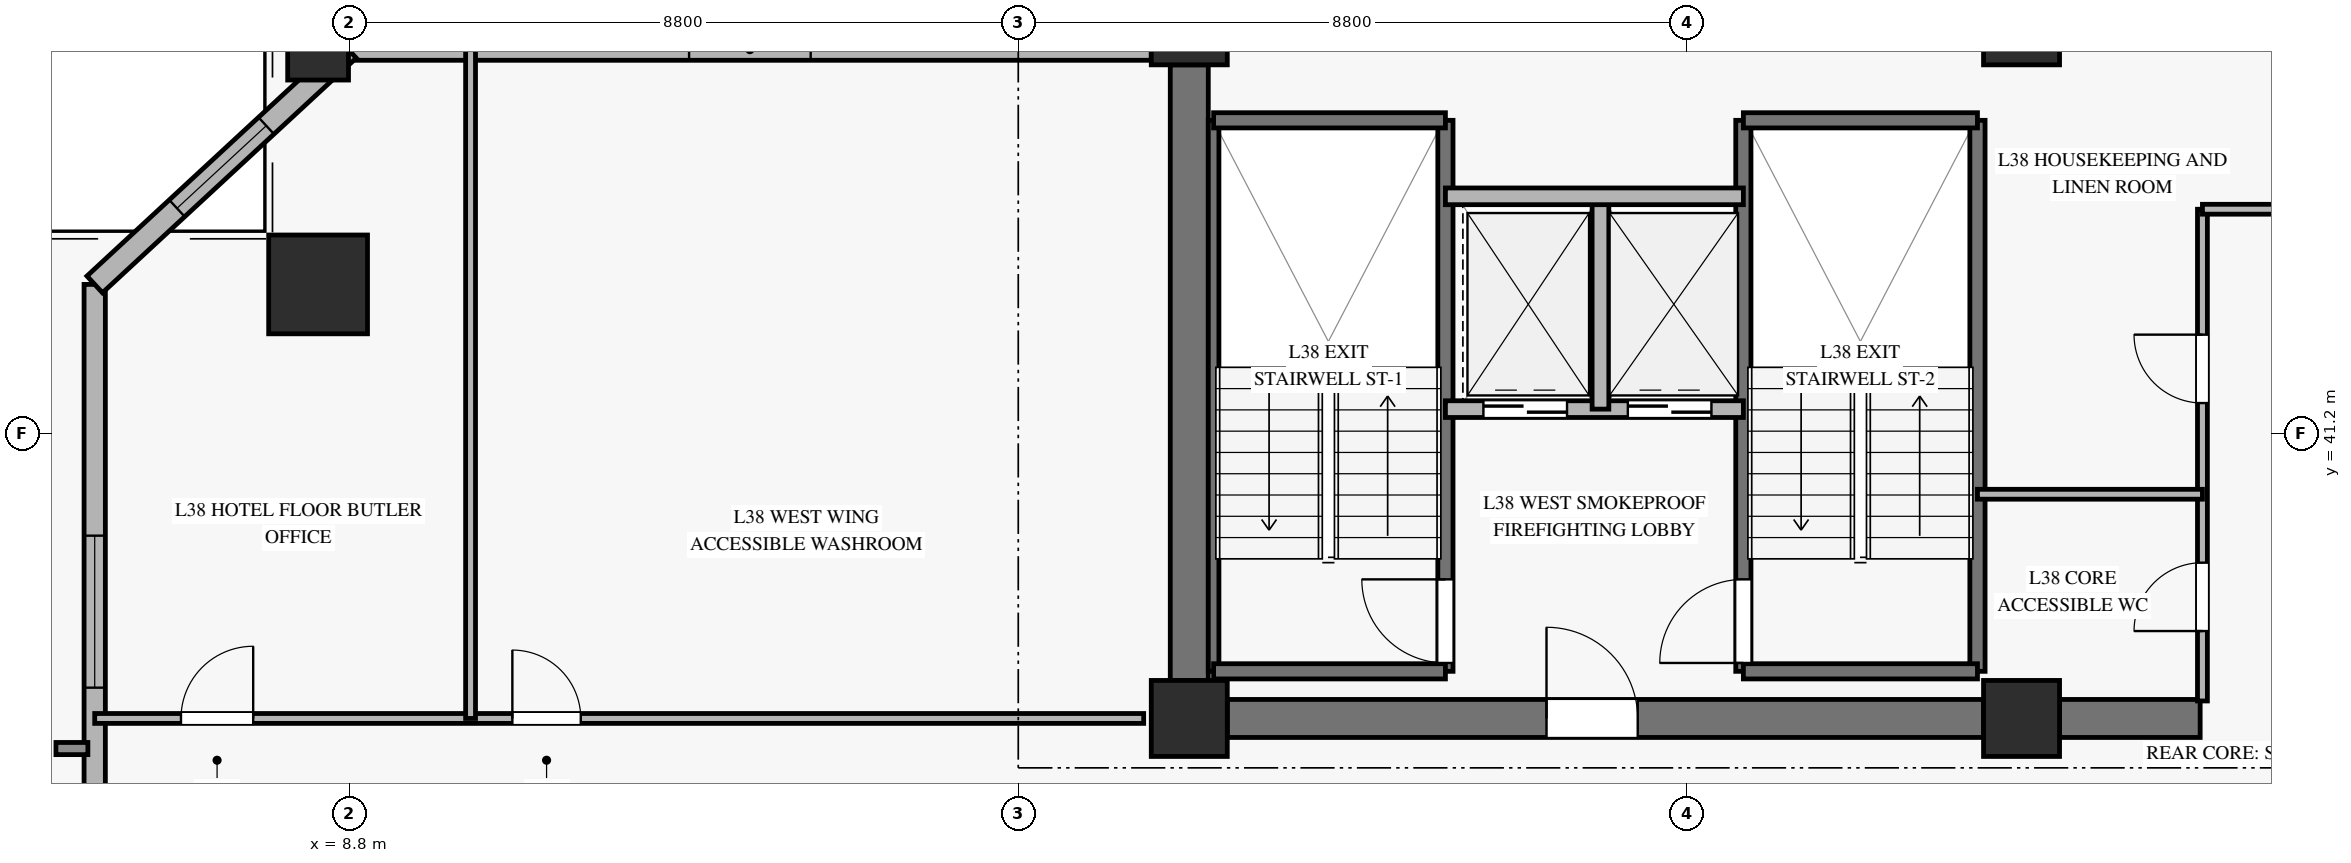
"""IFC4 building model, lengths in metres.
Left out: names, types, materials, properties, quantities, classifications, styles, units other than length and angle.
Written with IfcOpenShell. Run it as: python <this file> out.ifc"""

import sys

from ifc_helpers import new_model, si_unit, direction, frame, frame_2d, origin, origin_2d, place, context, subcontext, project, spatial, rectangle, hollow_rectangle, extrude, source, transform, mapped, element, fill, save


model = new_model("IFC4")
c1 = context("Model", 3, precision=1e-05, world=origin(), true_north=direction((0.0, 1.0)))
c2 = subcontext(c1, "Body", "Model", "MODEL_VIEW")
j1 = project(units=[si_unit("LENGTHUNIT", "METRE"), si_unit("PLANEANGLEUNIT", "RADIAN")], contexts=[c1])
p1 = place(None, origin())
s1 = spatial("IfcSite", under=j1, at=p1, CompositionType="ELEMENT")
p2 = place(p1, origin())
s2 = spatial("IfcBuilding", under=s1, at=p2, CompositionType="ELEMENT")
p3 = place(p2, frame((0.0, 0.0, 156.2)))
s3 = spatial("IfcBuildingStorey", under=s2, at=p3, CompositionType="ELEMENT", Elevation=156.2)
m1 = source(origin(), c2, "Body", "SweptSolid", [
    extrude(rectangle(XDim=1.0, YDim=1.0, at=origin_2d()), origin(), (0.0, 0.0, 1.0), 3.27),
])
for number, where, z_axis, x_axis in (
    (1, (19.85, 37.45, 0.0), (0.0, 0.0, 1.0), (1.0, 0.0, 0.0)),
    (2, (19.85, 46.55, 0.0), (0.0, 0.0, 1.0), (1.0, 0.0, 0.0)),
    (3, (30.8, 37.45, 0.0), (0.0, 0.0, 1.0), (1.0, 0.0, 0.0)),
    (4, (30.8, 46.55, 0.0), (0.0, 0.0, 1.0), (1.0, 0.0, 0.0)),
):
    element("IfcColumn", number, at=place(p3, frame(where, z_axis=z_axis, x_axis=x_axis)), inside=s3, PredefinedType="PILASTER", context=c2, shape_type="MappedRepresentation", body=[
        mapped(m1, transform((0.0, 0.0, 0.0), x_axis=(1.0, 0.0, 0.0), y_axis=(0.0, 1.0, 0.0), z_axis=(0.0, 0.0, 1.0), scale=1.0)),
    ])
p4 = place(p3, frame((20.35, 37.45, 0.0), z_axis=(0.0, 0.0, 1.0), x_axis=(1.0, 0.0, 0.0)))
e5 = element("IfcWall", 5, at=p4, inside=s3, PredefinedType="SHEAR", context=c2, shape_type="SweptSolid", body=[
    extrude(rectangle(XDim=9.95, YDim=0.5, at=frame_2d((4.975, 0.0))), origin(), (0.0, 0.0, 1.0), 3.27),
])
p5 = place(p4, frame((4.2, 0.0, 0.0)))
e6 = element("IfcOpeningElement", 6, at=p5, cuts=e5, PredefinedType="OPENING", context=c2, shape_type="SweptSolid", body=[
    extrude(rectangle(XDim=1.2, YDim=2.15, at=frame_2d((0.6, 1.075))), frame((0.0, 0.26, 0.0), z_axis=(0.0, -1.0, 0.0), x_axis=(1.0, 0.0, 0.0)), (0.0, 0.0, 1.0), 0.52),
])
p6 = place(p3, frame((31.3, 37.45, 0.0), z_axis=(0.0, 0.0, 1.0), x_axis=(1.0, 0.0, 0.0)))
e7 = element("IfcWall", 7, at=p6, inside=s3, PredefinedType="SHEAR", context=c2, shape_type="SweptSolid", body=[
    extrude(rectangle(XDim=1.85, YDim=0.5, at=frame_2d((0.925, 0.0))), origin(), (0.0, 0.0, 1.0), 3.27),
])
p7 = place(p3, frame((19.85, 37.95, 0.0), z_axis=(0.0, 0.0, 1.0), x_axis=(0.0, 1.0, 0.0)))
e8 = element("IfcWall", 8, at=p7, inside=s3, PredefinedType="SHEAR", context=c2, shape_type="SweptSolid", body=[
    extrude(rectangle(XDim=8.1, YDim=0.5, at=frame_2d((4.05, 0.0))), origin(), (0.0, 0.0, 1.0), 3.27),
])
m2 = source(origin(), c2, "Body", "SweptSolid", [
    extrude(hollow_rectangle(XDim=1.3, YDim=1.3, WallThickness=0.06, at=origin_2d()), origin(), (0.0, 0.0, 1.0), 3.277),
])
p8 = place(p3, frame((8.388, 43.161, 0.0), z_axis=(0.063777069764, 0.007972133721, 0.997932327594), x_axis=(-0.124034734589, 0.992277876714, 0.0)))
e9 = element("IfcColumn", 9, at=p8, inside=s3, PredefinedType="COLUMN", context=c2, shape_type="MappedRepresentation", body=[
    mapped(m2, transform((0.0, 0.0, 0.0), x_axis=(1.0, 0.0, 0.0), y_axis=(0.0, 1.0, 0.0), z_axis=(0.0, 0.0, 1.0), scale=1.0)),
])
m3 = source(origin(), c2, "Body", "SweptSolid", [
    extrude(hollow_rectangle(XDim=0.8, YDim=0.8, WallThickness=0.036, at=origin_2d()), origin(), (0.0, 0.0, 1.0), 3.277),
])
p9 = place(p3, frame((8.388, 46.25, 0.0), z_axis=(0.063779096534, 0.0, 0.997964040858), x_axis=(0.0, 1.0, 0.0)))
e10 = element("IfcColumn", 10, at=p9, inside=s3, PredefinedType="COLUMN", context=c2, shape_type="MappedRepresentation", body=[
    mapped(m3, transform((0.0, 0.0, 0.0), x_axis=(1.0, 0.0, 0.0), y_axis=(0.0, 1.0, 0.0), z_axis=(0.0, 0.0, 1.0), scale=1.0)),
])
p10 = place(p3, frame((5.449, 27.736, 0.0), z_axis=(0.0, 0.0, 1.0), x_axis=(0.0, 1.0, 0.0)))
e11 = element("IfcWall", 11, at=p10, inside=s3, PredefinedType="SOLIDWALL", context=c2, shape_type="SweptSolid", body=[
    extrude(rectangle(XDim=15.425, YDim=0.28, at=frame_2d((7.712, 0.0))), origin(), (0.0, 0.0, 1.0), 2.75),
])
p11 = place(p10, frame((10.119, 0.0, 0.45)))
e12 = element("IfcOpeningElement", 12, at=p11, cuts=e11, PredefinedType="OPENING", context=c2, shape_type="SweptSolid", body=[
    extrude(rectangle(XDim=2.0, YDim=2.0, at=frame_2d((1.0, 1.0))), frame((0.0, 0.15, 0.0), z_axis=(0.0, -1.0, 0.0), x_axis=(1.0, 0.0, 0.0)), (0.0, 0.0, 1.0), 0.3),
])
p12 = place(p3, frame((8.788, 46.25, 0.0), z_axis=(0.0, 0.0, 1.0), x_axis=(1.0, 0.0, 0.0)))
e13 = element("IfcWall", 13, at=p12, inside=s3, PredefinedType="SOLIDWALL", context=c2, shape_type="SweptSolid", body=[
    extrude(rectangle(XDim=10.562, YDim=0.28, at=frame_2d((5.281, 0.0))), origin(), (0.0, 0.0, 1.0), 2.75),
])
p13 = place(p12, frame((4.481, 0.0, 0.45)))
e14 = element("IfcOpeningElement", 14, at=p13, cuts=e13, PredefinedType="OPENING", context=c2, shape_type="SweptSolid", body=[
    extrude(rectangle(XDim=1.6, YDim=2.0, at=frame_2d((0.8, 1.0))), frame((0.0, 0.15, 0.0), z_axis=(0.0, -1.0, 0.0), x_axis=(1.0, 0.0, 0.0)), (0.0, 0.0, 1.0), 0.3),
])
p14 = place(p3, frame((8.788, 46.25, 0.0), z_axis=(0.0, 0.0, 1.0), x_axis=(-0.734051949579, -0.679093318565, 0.0)))
e15 = element("IfcWall", 15, at=p14, inside=s3, PredefinedType="SOLIDWALL", context=c2, shape_type="SweptSolid", body=[
    extrude(rectangle(XDim=4.549, YDim=0.3, at=frame_2d((2.274, 0.0))), origin(), (0.0, 0.0, 1.0), 2.75),
])
p15 = place(p14, frame((1.474, 0.0, 0.45)))
e16 = element("IfcOpeningElement", 16, at=p15, cuts=e15, PredefinedType="OPENING", context=c2, shape_type="SweptSolid", body=[
    extrude(rectangle(XDim=1.6, YDim=2.0, at=frame_2d((0.8, 1.0))), frame((0.0, 0.16, 0.0), z_axis=(0.0, -1.0, 0.0), x_axis=(1.0, 0.0, 0.0)), (0.0, 0.0, 1.0), 0.32),
])
p16 = place(p3, frame((20.17, 38.07, 0.0), z_axis=(0.0, 0.0, 1.0), x_axis=(0.0, 1.0, 0.0)))
e17 = element("IfcWall", 17, at=p16, inside=s3, PredefinedType="SOLIDWALL", context=c2, shape_type="SweptSolid", body=[
    extrude(rectangle(XDim=7.25, YDim=0.14, at=frame_2d((3.625, 0.0))), origin(), (0.0, 0.0, 1.0), 3.5),
])
p17 = place(p3, frame((23.22, 38.07, 0.0), z_axis=(0.0, 0.0, 1.0), x_axis=(0.0, 1.0, 0.0)))
e18 = element("IfcWall", 18, at=p17, inside=s3, PredefinedType="SOLIDWALL", context=c2, shape_type="SweptSolid", body=[
    extrude(rectangle(XDim=7.25, YDim=0.2, at=frame_2d((3.625, 0.0))), origin(), (0.0, 0.0, 1.0), 3.5),
])
p18 = place(p17, frame((0.11, 0.0, 0.0)))
e19 = element("IfcOpeningElement", 19, at=p18, cuts=e18, PredefinedType="OPENING", context=c2, shape_type="SweptSolid", body=[
    extrude(rectangle(XDim=1.1, YDim=2.15, at=frame_2d((0.55, 1.075))), frame((0.0, 0.11, 0.0), z_axis=(0.0, -1.0, 0.0), x_axis=(1.0, 0.0, 0.0)), (0.0, 0.0, 1.0), 0.22),
])
for number, where, z_axis, x_axis in (
    (20, (20.17, 45.32, 0.0), (0.0, 0.0, 1.0), (1.0, 0.0, 0.0)),
    (21, (20.17, 38.07, 0.0), (0.0, 0.0, 1.0), (1.0, 0.0, 0.0)),
):
    element("IfcWall", number, at=place(p3, frame(where, z_axis=z_axis, x_axis=x_axis)), inside=s3, PredefinedType="SOLIDWALL", context=c2, shape_type="SweptSolid", body=[
        extrude(rectangle(XDim=3.05, YDim=0.2, at=frame_2d((1.525, 0.0))), origin(), (0.0, 0.0, 1.0), 3.5),
    ])
p19 = place(p3, frame((27.14, 38.07, 0.0), z_axis=(0.0, 0.0, 1.0), x_axis=(0.0, 1.0, 0.0)))
e22 = element("IfcWall", 22, at=p19, inside=s3, PredefinedType="SOLIDWALL", context=c2, shape_type="SweptSolid", body=[
    extrude(rectangle(XDim=7.25, YDim=0.2, at=frame_2d((3.625, 0.0))), origin(), (0.0, 0.0, 1.0), 3.5),
])
p20 = place(p19, frame((0.11, 0.0, 0.0)))
e23 = element("IfcOpeningElement", 23, at=p20, cuts=e22, PredefinedType="OPENING", context=c2, shape_type="SweptSolid", body=[
    extrude(rectangle(XDim=1.1, YDim=2.15, at=frame_2d((0.55, 1.075))), frame((0.0, 0.11, 0.0), z_axis=(0.0, -1.0, 0.0), x_axis=(1.0, 0.0, 0.0)), (0.0, 0.0, 1.0), 0.22),
])
p21 = place(p3, frame((30.22, 38.07, 0.0), z_axis=(0.0, 0.0, 1.0), x_axis=(0.0, 1.0, 0.0)))
e24 = element("IfcWall", 24, at=p21, inside=s3, PredefinedType="SOLIDWALL", context=c2, shape_type="SweptSolid", body=[
    extrude(rectangle(XDim=7.25, YDim=0.2, at=frame_2d((3.625, 0.0))), origin(), (0.0, 0.0, 1.0), 3.5),
])
for number, where, z_axis, x_axis in (
    (25, (27.14, 45.32, 0.0), (0.0, 0.0, 1.0), (1.0, 0.0, 0.0)),
    (26, (27.14, 38.07, 0.0), (0.0, 0.0, 1.0), (1.0, 0.0, 0.0)),
):
    element("IfcWall", number, at=place(p3, frame(where, z_axis=z_axis, x_axis=x_axis)), inside=s3, PredefinedType="SOLIDWALL", context=c2, shape_type="SweptSolid", body=[
        extrude(rectangle(XDim=3.08, YDim=0.2, at=frame_2d((1.54, 0.0))), origin(), (0.0, 0.0, 1.0), 3.5),
    ])
p22 = place(p3, frame((23.22, 41.52, 0.0), z_axis=(0.0, 0.0, 1.0), x_axis=(1.0, 0.0, 0.0)))
e27 = element("IfcWall", 27, at=p22, inside=s3, PredefinedType="SOLIDWALL", context=c2, shape_type="SweptSolid", body=[
    extrude(rectangle(XDim=3.92, YDim=0.22, at=frame_2d((1.96, 0.0))), origin(), (0.0, 0.0, 1.0), 3.27),
])
p23 = place(p22, frame((0.5, 0.0, 0.0)))
e28 = element("IfcOpeningElement", 28, at=p23, cuts=e27, PredefinedType="OPENING", context=c2, shape_type="SweptSolid", body=[
    extrude(rectangle(XDim=1.1, YDim=2.2, at=frame_2d((0.55, 1.1))), frame((0.0, 0.12, 0.0), z_axis=(0.0, -1.0, 0.0), x_axis=(1.0, 0.0, 0.0)), (0.0, 0.0, 1.0), 0.24),
])
p24 = place(p22, frame((2.4, 0.0, 0.0)))
e29 = element("IfcOpeningElement", 29, at=p24, cuts=e27, PredefinedType="OPENING", context=c2, shape_type="SweptSolid", body=[
    extrude(rectangle(XDim=1.1, YDim=2.2, at=frame_2d((0.55, 1.1))), frame((0.0, 0.12, 0.0), z_axis=(0.0, -1.0, 0.0), x_axis=(1.0, 0.0, 0.0)), (0.0, 0.0, 1.0), 0.24),
])
p25 = place(p3, frame((25.26, 41.52, 0.0), z_axis=(0.0, 0.0, 1.0), x_axis=(0.0, 1.0, 0.0)))
e30 = element("IfcWall", 30, at=p25, inside=s3, PredefinedType="SOLIDWALL", context=c2, shape_type="SweptSolid", body=[
    extrude(rectangle(XDim=2.8, YDim=0.22, at=frame_2d((1.4, 0.0))), origin(), (0.0, 0.0, 1.0), 3.27),
])
p26 = place(p3, frame((23.22, 44.32, 0.0), z_axis=(0.0, 0.0, 1.0), x_axis=(1.0, 0.0, 0.0)))
e31 = element("IfcWall", 31, at=p26, inside=s3, PredefinedType="SOLIDWALL", context=c2, shape_type="SweptSolid", body=[
    extrude(rectangle(XDim=3.92, YDim=0.22, at=frame_2d((1.96, 0.0))), origin(), (0.0, 0.0, 1.0), 3.27),
])
p27 = place(p3, frame((33.18, 37.68, 0.0), z_axis=(0.0, 0.0, 1.0), x_axis=(0.0, 1.0, 0.0)))
e32 = element("IfcWall", 32, at=p27, inside=s3, PredefinedType="PARTITIONING", context=c2, shape_type="SweptSolid", body=[
    extrude(rectangle(XDim=6.47, YDim=0.13, at=frame_2d((3.235, 0.0))), origin(), (0.0, 0.0, 1.0), 2.355),
])
p28 = place(p27, frame((0.92, 0.0, 0.0)))
e33 = element("IfcOpeningElement", 33, at=p28, cuts=e32, PredefinedType="OPENING", context=c2, shape_type="SweptSolid", body=[
    extrude(rectangle(XDim=0.9, YDim=2.1, at=frame_2d((0.45, 1.05))), frame((0.0, 0.075, 0.0), z_axis=(0.0, -1.0, 0.0), x_axis=(1.0, 0.0, 0.0)), (0.0, 0.0, 1.0), 0.15),
])
p29 = place(p27, frame((3.92, 0.0, 0.0)))
e34 = element("IfcOpeningElement", 34, at=p29, cuts=e32, PredefinedType="OPENING", context=c2, shape_type="SweptSolid", body=[
    extrude(rectangle(XDim=0.9, YDim=2.1, at=frame_2d((0.45, 1.05))), frame((0.0, 0.075, 0.0), z_axis=(0.0, -1.0, 0.0), x_axis=(1.0, 0.0, 0.0)), (0.0, 0.0, 1.0), 0.15),
])
p30 = place(p3, frame((33.18, 44.15, 0.0), z_axis=(0.0, 0.0, 1.0), x_axis=(1.0, 0.0, 0.0)))
e35 = element("IfcWall", 35, at=p30, inside=s3, PredefinedType="PARTITIONING", context=c2, shape_type="SweptSolid", body=[
    extrude(rectangle(XDim=2.97, YDim=0.13, at=frame_2d((1.485, 0.0))), origin(), (0.0, 0.0, 1.0), 2.555),
])
p31 = place(p3, frame((30.22, 40.4, 0.0), z_axis=(0.0, 0.0, 1.0), x_axis=(1.0, 0.0, 0.0)))
e36 = element("IfcWall", 36, at=p31, inside=s3, PredefinedType="PARTITIONING", context=c2, shape_type="SweptSolid", body=[
    extrude(rectangle(XDim=2.96, YDim=0.13, at=frame_2d((1.48, 0.0))), origin(), (0.0, 0.0, 1.0), 2.555),
])
p32 = place(p3, frame((5.449, 37.45, 0.0), z_axis=(0.0, 0.0, 1.0), x_axis=(1.0, 0.0, 0.0)))
e37 = element("IfcWall", 37, at=p32, inside=s3, PredefinedType="PARTITIONING", context=c2, shape_type="SweptSolid", body=[
    extrude(rectangle(XDim=13.801, YDim=0.13, at=frame_2d((6.9, 0.0))), origin(), (0.0, 0.0, 1.0), 2.755),
])
p33 = place(p32, frame((1.135, 0.0, 0.0)))
e38 = element("IfcOpeningElement", 38, at=p33, cuts=e37, PredefinedType="OPENING", context=c2, shape_type="SweptSolid", body=[
    extrude(rectangle(XDim=0.95, YDim=2.1, at=frame_2d((0.475, 1.05))), frame((0.0, 0.075, 0.0), z_axis=(0.0, -1.0, 0.0), x_axis=(1.0, 0.0, 0.0)), (0.0, 0.0, 1.0), 0.15),
])
p34 = place(p32, frame((5.495, 0.0, 0.0)))
e39 = element("IfcOpeningElement", 39, at=p34, cuts=e37, PredefinedType="OPENING", context=c2, shape_type="SweptSolid", body=[
    extrude(rectangle(XDim=0.9, YDim=2.1, at=frame_2d((0.45, 1.05))), frame((0.0, 0.075, 0.0), z_axis=(0.0, -1.0, 0.0), x_axis=(1.0, 0.0, 0.0)), (0.0, 0.0, 1.0), 0.15),
])
p35 = place(p3, frame((10.394, 37.45, 0.0), z_axis=(0.0, 0.0, 1.0), x_axis=(0.0, 1.0, 0.0)))
e40 = element("IfcWall", 40, at=p35, inside=s3, PredefinedType="PARTITIONING", context=c2, shape_type="SweptSolid", body=[
    extrude(rectangle(XDim=8.8, YDim=0.13, at=frame_2d((4.4, 0.0))), origin(), (0.0, 0.0, 1.0), 3.27),
])
m4 = source(origin(), c2, "Body", "SweptSolid", [
    extrude(rectangle(XDim=2.0, YDim=2.0, at=frame_2d((1.0, 1.0))), frame((0.0, 0.03, 0.0), z_axis=(0.0, -1.0, 0.0), x_axis=(1.0, 0.0, 0.0)), (0.0, 0.0, 1.0), 0.06),
])
p36 = place(p11, origin())
e41 = element("IfcWindow", 41, at=p36, inside=s3, PartitioningType="SINGLE_PANEL", PredefinedType="WINDOW", context=c2, shape_type="MappedRepresentation", body=[
    mapped(m4, transform((0.0, 0.0, 0.0), x_axis=(1.0, 0.0, 0.0), y_axis=(0.0, 1.0, 0.0), z_axis=(0.0, 0.0, 1.0), scale=1.0)),
])
fill(e12, e41)
m5 = source(origin(), c2, "Body", "SweptSolid", [
    extrude(rectangle(XDim=1.6, YDim=2.0, at=frame_2d((0.8, 1.0))), frame((0.0, 0.03, 0.0), z_axis=(0.0, -1.0, 0.0), x_axis=(1.0, 0.0, 0.0)), (0.0, 0.0, 1.0), 0.06),
])
p37 = place(p15, origin())
e42 = element("IfcWindow", 42, at=p37, inside=s3, PartitioningType="SINGLE_PANEL", PredefinedType="WINDOW", context=c2, shape_type="MappedRepresentation", body=[
    mapped(m5, transform((0.0, 0.0, 0.0), x_axis=(1.0, 0.0, 0.0), y_axis=(0.0, 1.0, 0.0), z_axis=(0.0, 0.0, 1.0), scale=1.0)),
])
fill(e16, e42)
m6 = source(origin(), c2, "Body", "SweptSolid", [
    extrude(rectangle(XDim=1.1, YDim=2.15, at=frame_2d((0.55, 1.075))), frame((0.0, 0.025, 0.0), z_axis=(0.0, -1.0, 0.0), x_axis=(1.0, 0.0, 0.0)), (0.0, 0.0, 1.0), 0.05),
])
p38 = place(p18, origin())
e43 = element("IfcDoor", 43, at=p38, inside=s3, OperationType="SINGLE_SWING_RIGHT", PredefinedType="DOOR", context=c2, shape_type="MappedRepresentation", body=[
    mapped(m6, transform((0.0, 0.0, 0.0), x_axis=(1.0, 0.0, 0.0), y_axis=(0.0, 1.0, 0.0), z_axis=(0.0, 0.0, 1.0), scale=1.0)),
])
fill(e19, e43)
p39 = place(p20, origin())
e44 = element("IfcDoor", 44, at=p39, inside=s3, OperationType="SINGLE_SWING_LEFT", PredefinedType="DOOR", context=c2, shape_type="MappedRepresentation", body=[
    mapped(m6, transform((0.0, 0.0, 0.0), x_axis=(1.0, 0.0, 0.0), y_axis=(0.0, 1.0, 0.0), z_axis=(0.0, 0.0, 1.0), scale=1.0)),
])
fill(e23, e44)
m7 = source(origin(), c2, "Body", "SweptSolid", [
    extrude(rectangle(XDim=1.1, YDim=2.2, at=frame_2d((0.55, 1.1))), frame((0.0, 0.025, 0.0), z_axis=(0.0, -1.0, 0.0), x_axis=(1.0, 0.0, 0.0)), (0.0, 0.0, 1.0), 0.05),
])
p40 = place(p23, origin())
e45 = element("IfcDoor", 45, at=p40, inside=s3, OperationType="SLIDING_TO_LEFT", PredefinedType="DOOR", context=c2, shape_type="MappedRepresentation", body=[
    mapped(m7, transform((0.0, 0.0, 0.0), x_axis=(1.0, 0.0, 0.0), y_axis=(0.0, 1.0, 0.0), z_axis=(0.0, 0.0, 1.0), scale=1.0)),
])
fill(e28, e45)
p41 = place(p24, origin())
e46 = element("IfcDoor", 46, at=p41, inside=s3, OperationType="SLIDING_TO_LEFT", PredefinedType="DOOR", context=c2, shape_type="MappedRepresentation", body=[
    mapped(m7, transform((0.0, 0.0, 0.0), x_axis=(1.0, 0.0, 0.0), y_axis=(0.0, 1.0, 0.0), z_axis=(0.0, 0.0, 1.0), scale=1.0)),
])
fill(e29, e46)
m8 = source(origin(), c2, "Body", "SweptSolid", [
    extrude(rectangle(XDim=1.2, YDim=2.15, at=frame_2d((0.6, 1.075))), frame((0.0, 0.025, 0.0), z_axis=(0.0, -1.0, 0.0), x_axis=(1.0, 0.0, 0.0)), (0.0, 0.0, 1.0), 0.05),
])
p42 = place(p5, origin())
e47 = element("IfcDoor", 47, at=p42, inside=s3, OperationType="SINGLE_SWING_LEFT", PredefinedType="DOOR", context=c2, shape_type="MappedRepresentation", body=[
    mapped(m8, transform((0.0, 0.0, 0.0), x_axis=(1.0, 0.0, 0.0), y_axis=(0.0, 1.0, 0.0), z_axis=(0.0, 0.0, 1.0), scale=1.0)),
])
fill(e6, e47)
m9 = source(origin(), c2, "Body", "SweptSolid", [
    extrude(rectangle(XDim=0.9, YDim=2.1, at=frame_2d((0.45, 1.05))), frame((0.0, 0.025, 0.0), z_axis=(0.0, -1.0, 0.0), x_axis=(1.0, 0.0, 0.0)), (0.0, 0.0, 1.0), 0.05),
])
p43 = place(p28, origin())
e48 = element("IfcDoor", 48, at=p43, inside=s3, OperationType="SINGLE_SWING_LEFT", PredefinedType="DOOR", context=c2, shape_type="MappedRepresentation", body=[
    mapped(m9, transform((0.0, 0.0, 0.0), x_axis=(1.0, 0.0, 0.0), y_axis=(0.0, 1.0, 0.0), z_axis=(0.0, 0.0, 1.0), scale=1.0)),
])
fill(e33, e48)
p44 = place(p29, origin())
e49 = element("IfcDoor", 49, at=p44, inside=s3, OperationType="SINGLE_SWING_RIGHT", PredefinedType="DOOR", context=c2, shape_type="MappedRepresentation", body=[
    mapped(m9, transform((0.0, 0.0, 0.0), x_axis=(1.0, 0.0, 0.0), y_axis=(0.0, 1.0, 0.0), z_axis=(0.0, 0.0, 1.0), scale=1.0)),
])
fill(e34, e49)
m10 = source(origin(), c2, "Body", "SweptSolid", [
    extrude(rectangle(XDim=0.95, YDim=2.1, at=frame_2d((0.475, 1.05))), frame((0.0, 0.025, 0.0), z_axis=(0.0, -1.0, 0.0), x_axis=(1.0, 0.0, 0.0)), (0.0, 0.0, 1.0), 0.05),
])
p45 = place(p33, origin())
e50 = element("IfcDoor", 50, at=p45, inside=s3, OperationType="SINGLE_SWING_RIGHT", PredefinedType="DOOR", context=c2, shape_type="MappedRepresentation", body=[
    mapped(m10, transform((0.0, 0.0, 0.0), x_axis=(1.0, 0.0, 0.0), y_axis=(0.0, 1.0, 0.0), z_axis=(0.0, 0.0, 1.0), scale=1.0)),
])
fill(e38, e50)
p46 = place(p34, origin())
e51 = element("IfcDoor", 51, at=p46, inside=s3, OperationType="SINGLE_SWING_LEFT", PredefinedType="DOOR", context=c2, shape_type="MappedRepresentation", body=[
    mapped(m9, transform((0.0, 0.0, 0.0), x_axis=(1.0, 0.0, 0.0), y_axis=(0.0, 1.0, 0.0), z_axis=(0.0, 0.0, 1.0), scale=1.0)),
])
fill(e39, e51)
save(model, sys.argv[1])
